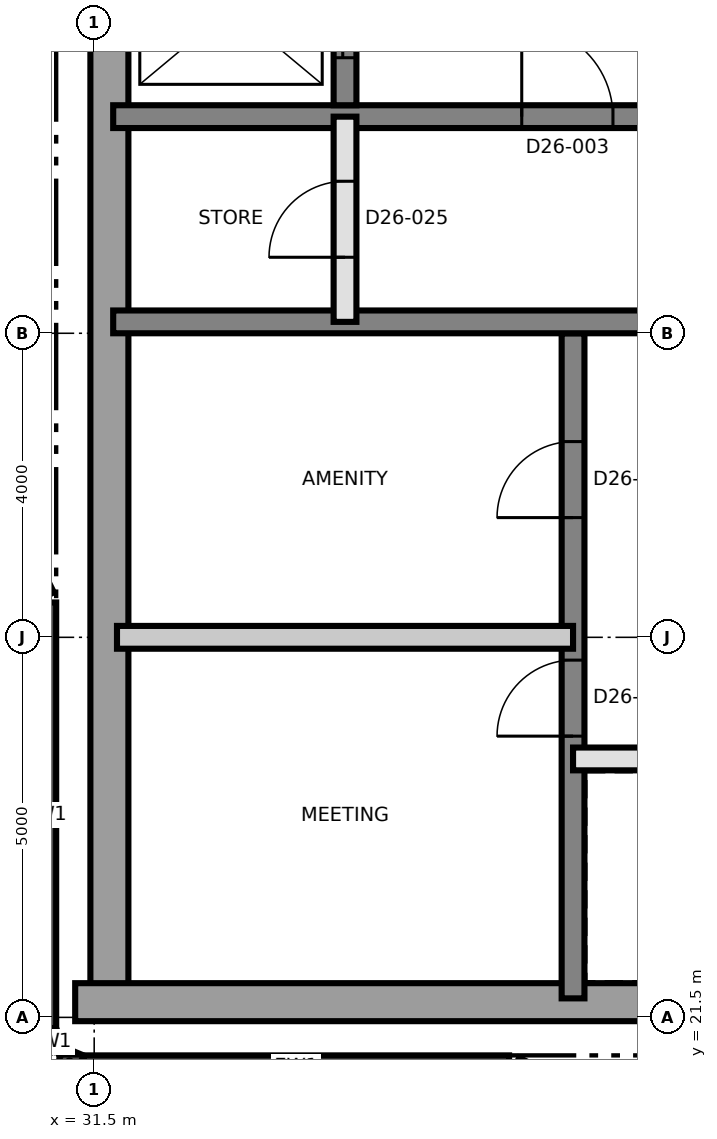
"""IFC4 building model, lengths in metres.
Left out: names, types, materials, properties, quantities, classifications, styles, units other than length and angle.
Written with IfcOpenShell. Run it as: python <this file> out.ifc"""

import sys

from ifc_helpers import new_model, si_unit, direction, frame, frame_2d, origin, place, context, subcontext, project, spatial, rectangle, extrude, element, fill, save


model = new_model("IFC4")
c1 = context("Model", 3, precision=1e-05, world=origin(), true_north=direction((0.0, 1.0)))
c2 = subcontext(c1, "Body", "Model", "MODEL_VIEW")
j1 = project(units=[si_unit("LENGTHUNIT", "METRE"), si_unit("PLANEANGLEUNIT", "RADIAN")], contexts=[c1])
p1 = place(None, origin())
s1 = spatial("IfcSite", under=j1, at=p1, CompositionType="ELEMENT")
p2 = place(p1, origin())
s2 = spatial("IfcBuilding", under=s1, at=p2, CompositionType="ELEMENT")
p3 = place(p2, frame((0.0, 0.0, 236.5)))
s3 = spatial("IfcBuildingStorey", under=s2, at=p3, CompositionType="ELEMENT", Elevation=236.5)
p4 = place(p3, frame((31.7, 21.75, 0.0), z_axis=(0.0, 0.0, 1.0), x_axis=(0.0, 1.0, 0.0)))
e1 = element("IfcWall", 1, at=p4, inside=s3, PredefinedType="SHEAR", context=c2, shape_type="SweptSolid", body=[
    extrude(rectangle(XDim=17.5, YDim=0.5, at=frame_2d((8.75, 0.0))), origin(), (0.0, 0.0, 1.0), 3.7),
])
p5 = place(p3, frame((31.25, 21.7, 0.0), z_axis=(0.0, 0.0, 1.0), x_axis=(1.0, 0.0, 0.0)))
e2 = element("IfcWall", 2, at=p5, inside=s3, PredefinedType="SHEAR", context=c2, shape_type="SweptSolid", body=[
    extrude(rectangle(XDim=27.0, YDim=0.5, at=frame_2d((13.5, 0.0))), origin(), (0.0, 0.0, 1.0), 3.7),
])
p6 = place(p3, frame((37.8, 21.75, 0.0), z_axis=(0.0, 0.0, 1.0), x_axis=(0.0, 1.0, 0.0)))
e3 = element("IfcWall", 3, at=p6, inside=s3, PredefinedType="SHEAR", context=c2, shape_type="SweptSolid", body=[
    extrude(rectangle(XDim=8.75, YDim=0.3, at=frame_2d((4.375, 0.0))), origin(), (0.0, 0.0, 1.0), 3.7),
])
p7 = place(p6, frame((6.325, 0.0, 0.0)))
e4 = element("IfcOpeningElement", 4, at=p7, cuts=e3, PredefinedType="OPENING", context=c2, shape_type="SweptSolid", body=[
    extrude(rectangle(XDim=1.0, YDim=2.1, at=frame_2d((0.5, 1.05))), frame((0.0, 0.16, 0.0), z_axis=(0.0, -1.0, 0.0), x_axis=(1.0, 0.0, 0.0)), (0.0, 0.0, 1.0), 0.32),
])
p8 = place(p6, frame((3.45, 0.0, 0.0)))
e5 = element("IfcOpeningElement", 5, at=p8, cuts=e3, PredefinedType="OPENING", context=c2, shape_type="SweptSolid", body=[
    extrude(rectangle(XDim=1.0, YDim=2.1, at=frame_2d((0.5, 1.05))), frame((0.0, 0.16, 0.0), z_axis=(0.0, -1.0, 0.0), x_axis=(1.0, 0.0, 0.0)), (0.0, 0.0, 1.0), 0.32),
])
p9 = place(p3, frame((31.75, 30.65, 0.0), z_axis=(0.0, 0.0, 1.0), x_axis=(1.0, 0.0, 0.0)))
e6 = element("IfcWall", 6, at=p9, inside=s3, PredefinedType="SHEAR", context=c2, shape_type="SweptSolid", body=[
    extrude(rectangle(XDim=26.5, YDim=0.3, at=frame_2d((13.25, 0.0))), origin(), (0.0, 0.0, 1.0), 3.7),
])
p10 = place(p9, frame((24.75, 0.0, 0.0)))
e7 = element("IfcOpeningElement", 7, at=p10, cuts=e6, PredefinedType="OPENING", context=c2, shape_type="SweptSolid", body=[
    extrude(rectangle(XDim=1.0, YDim=2.1, at=frame_2d((0.5, 1.05))), frame((0.0, 0.16, 0.0), z_axis=(0.0, -1.0, 0.0), x_axis=(1.0, 0.0, 0.0)), (0.0, 0.0, 1.0), 0.32),
])
p11 = place(p3, frame((31.75, 33.35, 0.0), z_axis=(0.0, 0.0, 1.0), x_axis=(1.0, 0.0, 0.0)))
e8 = element("IfcWall", 8, at=p11, inside=s3, PredefinedType="SHEAR", context=c2, shape_type="SweptSolid", body=[
    extrude(rectangle(XDim=26.5, YDim=0.3, at=frame_2d((13.25, 0.0))), origin(), (0.0, 0.0, 1.0), 3.7),
])
p12 = place(p11, frame((13.9, 0.0, 0.0)))
e9 = element("IfcOpeningElement", 9, at=p12, cuts=e8, PredefinedType="OPENING", context=c2, shape_type="SweptSolid", body=[
    extrude(rectangle(XDim=1.4, YDim=2.1, at=frame_2d((0.7, 1.05))), frame((0.0, 0.16, 0.0), z_axis=(0.0, -1.0, 0.0), x_axis=(1.0, 0.0, 0.0)), (0.0, 0.0, 1.0), 0.32),
])
p13 = place(p11, frame((5.375, 0.0, 0.0)))
e10 = element("IfcOpeningElement", 10, at=p13, cuts=e8, PredefinedType="OPENING", context=c2, shape_type="SweptSolid", body=[
    extrude(rectangle(XDim=1.2, YDim=2.1, at=frame_2d((0.6, 1.05))), frame((0.0, 0.16, 0.0), z_axis=(0.0, -1.0, 0.0), x_axis=(1.0, 0.0, 0.0)), (0.0, 0.0, 1.0), 0.32),
])
p14 = place(p11, frame((19.925, 0.0, 0.0)))
e11 = element("IfcOpeningElement", 11, at=p14, cuts=e8, PredefinedType="OPENING", context=c2, shape_type="SweptSolid", body=[
    extrude(rectangle(XDim=1.2, YDim=2.1, at=frame_2d((0.6, 1.05))), frame((0.0, 0.16, 0.0), z_axis=(0.0, -1.0, 0.0), x_axis=(1.0, 0.0, 0.0)), (0.0, 0.0, 1.0), 0.32),
])
p15 = place(p3, frame((34.8, 33.5, 0.0), z_axis=(0.0, 0.0, 1.0), x_axis=(0.0, 1.0, 0.0)))
e12 = element("IfcWall", 12, at=p15, inside=s3, PredefinedType="SHEAR", context=c2, shape_type="SweptSolid", body=[
    extrude(rectangle(XDim=2.55, YDim=0.3, at=frame_2d((1.275, 0.0))), origin(), (0.0, 0.0, 1.0), 3.7),
])
p16 = place(p15, frame((0.625, 0.0, 0.0)))
e13 = element("IfcOpeningElement", 13, at=p16, cuts=e12, PredefinedType="OPENING", context=c2, shape_type="SweptSolid", body=[
    extrude(rectangle(XDim=1.3, YDim=2.4, at=frame_2d((0.65, 1.2))), frame((0.0, 0.16, 0.0), z_axis=(0.0, -1.0, 0.0), x_axis=(1.0, 0.0, 0.0)), (0.0, 0.0, 1.0), 0.32),
])
p17 = place(p3, frame((30.85, 26.959, 0.0), z_axis=(0.0, 0.0, 1.0), x_axis=(0.0, -1.0, 0.0)))
e14 = element("IfcWall", 14, at=p17, inside=s3, PredefinedType="SOLIDWALL", context=c2, shape_type="SweptSolid", body=[
    extrude(rectangle(XDim=5.599, YDim=0.3, at=frame_2d((2.8, 0.0))), origin(), (0.0, 0.0, 1.0), 3.4),
])
for number, where, z_axis, x_axis in (
    (15, (30.861, 21.302, 0.0), (0.0, 0.0, 1.0), (0.383, -0.924, 0.0)),
    (16, (31.048, 20.967, 0.0), (0.0, 0.0, 1.0), (0.924, -0.383, 0.0)),
):
    element("IfcWall", number, at=place(p3, frame(where, z_axis=z_axis, x_axis=x_axis)), inside=s3, PredefinedType="SOLIDWALL", context=c2, shape_type="SweptSolid", body=[
        extrude(rectangle(XDim=0.275, YDim=0.3, at=frame_2d((0.138, 0.0))), origin(), (0.0, 0.0, 1.0), 3.4),
    ])
p18 = place(p3, frame((31.36, 20.85, 0.0), z_axis=(0.0, 0.0, 1.0), x_axis=(1.0, 0.0, 0.0)))
e17 = element("IfcWall", 17, at=p18, inside=s3, PredefinedType="SOLIDWALL", context=c2, shape_type="SweptSolid", body=[
    extrude(rectangle(XDim=5.599, YDim=0.3, at=frame_2d((2.8, 0.0))), origin(), (0.0, 0.0, 1.0), 3.4),
])
for number, where, z_axis, x_axis in (
    (18, (37.025, 20.834, 0.0), (0.0, 0.0, 1.0), (0.897, -0.442, 0.0)),
    (19, (30.216, 28.28, 0.0), (0.0, 0.0, 1.0), (0.442, -0.897, 0.0)),
):
    element("IfcWall", number, at=place(p3, frame(where, z_axis=z_axis, x_axis=x_axis)), inside=s3, PredefinedType="SOLIDWALL", context=c2, shape_type="SweptSolid", body=[
        extrude(rectangle(XDim=1.399, YDim=0.3, at=frame_2d((0.7, 0.0))), origin(), (0.0, 0.0, 1.0), 3.4),
    ])
p19 = place(p3, frame((37.8, 24.9, 0.0), z_axis=(0.0, 0.0, 1.0), x_axis=(1.0, 0.0, 0.0)))
e20 = element("IfcWall", 20, at=p19, inside=s3, PredefinedType="SOLIDWALL", context=c2, shape_type="SweptSolid", body=[
    extrude(rectangle(XDim=12.0, YDim=0.3, at=frame_2d((6.0, 0.0))), origin(), (0.0, 0.0, 1.0), 3.4),
])
p20 = place(p19, frame((1.05, 0.0, 0.0)))
e21 = element("IfcOpeningElement", 21, at=p20, cuts=e20, PredefinedType="OPENING", context=c2, shape_type="SweptSolid", body=[
    extrude(rectangle(XDim=0.9, YDim=2.1, at=frame_2d((0.45, 1.05))), frame((0.0, 0.16, 0.0), z_axis=(0.0, -1.0, 0.0), x_axis=(1.0, 0.0, 0.0)), (0.0, 0.0, 1.0), 0.32),
])
p21 = place(p19, frame((10.05, 0.0, 0.0)))
e22 = element("IfcOpeningElement", 22, at=p21, cuts=e20, PredefinedType="OPENING", context=c2, shape_type="SweptSolid", body=[
    extrude(rectangle(XDim=0.9, YDim=2.1, at=frame_2d((0.45, 1.05))), frame((0.0, 0.16, 0.0), z_axis=(0.0, -1.0, 0.0), x_axis=(1.0, 0.0, 0.0)), (0.0, 0.0, 1.0), 0.32),
])
p22 = place(p19, frame((3.95, 0.0, 0.0)))
e23 = element("IfcOpeningElement", 23, at=p22, cuts=e20, PredefinedType="OPENING", context=c2, shape_type="SweptSolid", body=[
    extrude(rectangle(XDim=1.1, YDim=2.4, at=frame_2d((0.55, 1.2))), frame((0.0, 0.16, 0.0), z_axis=(0.0, -1.0, 0.0), x_axis=(1.0, 0.0, 0.0)), (0.0, 0.0, 1.0), 0.32),
])
p23 = place(p19, frame((6.95, 0.0, 0.0)))
e24 = element("IfcOpeningElement", 24, at=p23, cuts=e20, PredefinedType="OPENING", context=c2, shape_type="SweptSolid", body=[
    extrude(rectangle(XDim=1.1, YDim=2.4, at=frame_2d((0.55, 1.2))), frame((0.0, 0.16, 0.0), z_axis=(0.0, -1.0, 0.0), x_axis=(1.0, 0.0, 0.0)), (0.0, 0.0, 1.0), 0.32),
])
p24 = place(p3, frame((31.8, 26.5, 0.0), z_axis=(0.0, 0.0, 1.0), x_axis=(1.0, 0.0, 0.0)))
e25 = element("IfcWall", 25, at=p24, inside=s3, PredefinedType="PARTITIONING", context=c2, shape_type="SweptSolid", body=[
    extrude(rectangle(XDim=6.0, YDim=0.3, at=frame_2d((3.0, 0.0))), origin(), (0.0, 0.0, 1.0), 3.4),
])
p25 = place(p3, frame((34.8, 30.65, 0.0), z_axis=(0.0, 0.0, 1.0), x_axis=(0.0, 1.0, 0.0)))
e26 = element("IfcWall", 26, at=p25, inside=s3, PredefinedType="SOLIDWALL", context=c2, shape_type="SweptSolid", body=[
    extrude(rectangle(XDim=2.7, YDim=0.3, at=frame_2d((1.35, 0.0))), origin(), (0.0, 0.0, 1.0), 3.4),
])
p26 = place(p25, frame((0.85, 0.0, 0.0)))
e27 = element("IfcOpeningElement", 27, at=p26, cuts=e26, PredefinedType="OPENING", context=c2, shape_type="SweptSolid", body=[
    extrude(rectangle(XDim=1.0, YDim=2.1, at=frame_2d((0.5, 1.05))), frame((0.0, 0.16, 0.0), z_axis=(0.0, -1.0, 0.0), x_axis=(1.0, 0.0, 0.0)), (0.0, 0.0, 1.0), 0.32),
])
p27 = place(p13, origin())
e28 = element("IfcDoor", 28, at=p27, inside=s3, OperationType="SINGLE_SWING_LEFT", PredefinedType="DOOR", context=c2, shape_type="SweptSolid", body=[
    extrude(rectangle(XDim=1.2, YDim=2.1, at=frame_2d((0.6, 1.05))), frame((0.0, 0.025, 0.0), z_axis=(0.0, -1.0, 0.0), x_axis=(1.0, 0.0, 0.0)), (0.0, 0.0, 1.0), 0.05),
])
fill(e10, e28)
p28 = place(p16, origin())
e29 = element("IfcDoor", 29, at=p28, inside=s3, OperationType="SLIDING_TO_LEFT", PredefinedType="DOOR", context=c2, shape_type="SweptSolid", body=[
    extrude(rectangle(XDim=1.3, YDim=2.4, at=frame_2d((0.65, 1.2))), frame((0.0, 0.025, 0.0), z_axis=(0.0, -1.0, 0.0), x_axis=(1.0, 0.0, 0.0)), (0.0, 0.0, 1.0), 0.05),
])
fill(e13, e29)
p29 = place(p7, origin())
e30 = element("IfcDoor", 30, at=p29, inside=s3, OperationType="SINGLE_SWING_LEFT", PredefinedType="DOOR", context=c2, shape_type="SweptSolid", body=[
    extrude(rectangle(XDim=1.0, YDim=2.1, at=frame_2d((0.5, 1.05))), frame((0.0, 0.025, 0.0), z_axis=(0.0, -1.0, 0.0), x_axis=(1.0, 0.0, 0.0)), (0.0, 0.0, 1.0), 0.05),
])
fill(e4, e30)
p30 = place(p8, origin())
e31 = element("IfcDoor", 31, at=p30, inside=s3, OperationType="SINGLE_SWING_RIGHT", PredefinedType="DOOR", context=c2, shape_type="SweptSolid", body=[
    extrude(rectangle(XDim=1.0, YDim=2.1, at=frame_2d((0.5, 1.05))), frame((0.0, 0.025, 0.0), z_axis=(0.0, -1.0, 0.0), x_axis=(1.0, 0.0, 0.0)), (0.0, 0.0, 1.0), 0.05),
])
fill(e5, e31)
p31 = place(p26, origin())
e32 = element("IfcDoor", 32, at=p31, inside=s3, OperationType="SINGLE_SWING_LEFT", PredefinedType="DOOR", context=c2, shape_type="SweptSolid", body=[
    extrude(rectangle(XDim=1.0, YDim=2.1, at=frame_2d((0.5, 1.05))), frame((0.0, 0.025, 0.0), z_axis=(0.0, -1.0, 0.0), x_axis=(1.0, 0.0, 0.0)), (0.0, 0.0, 1.0), 0.05),
])
fill(e27, e32)
save(model, sys.argv[1])
